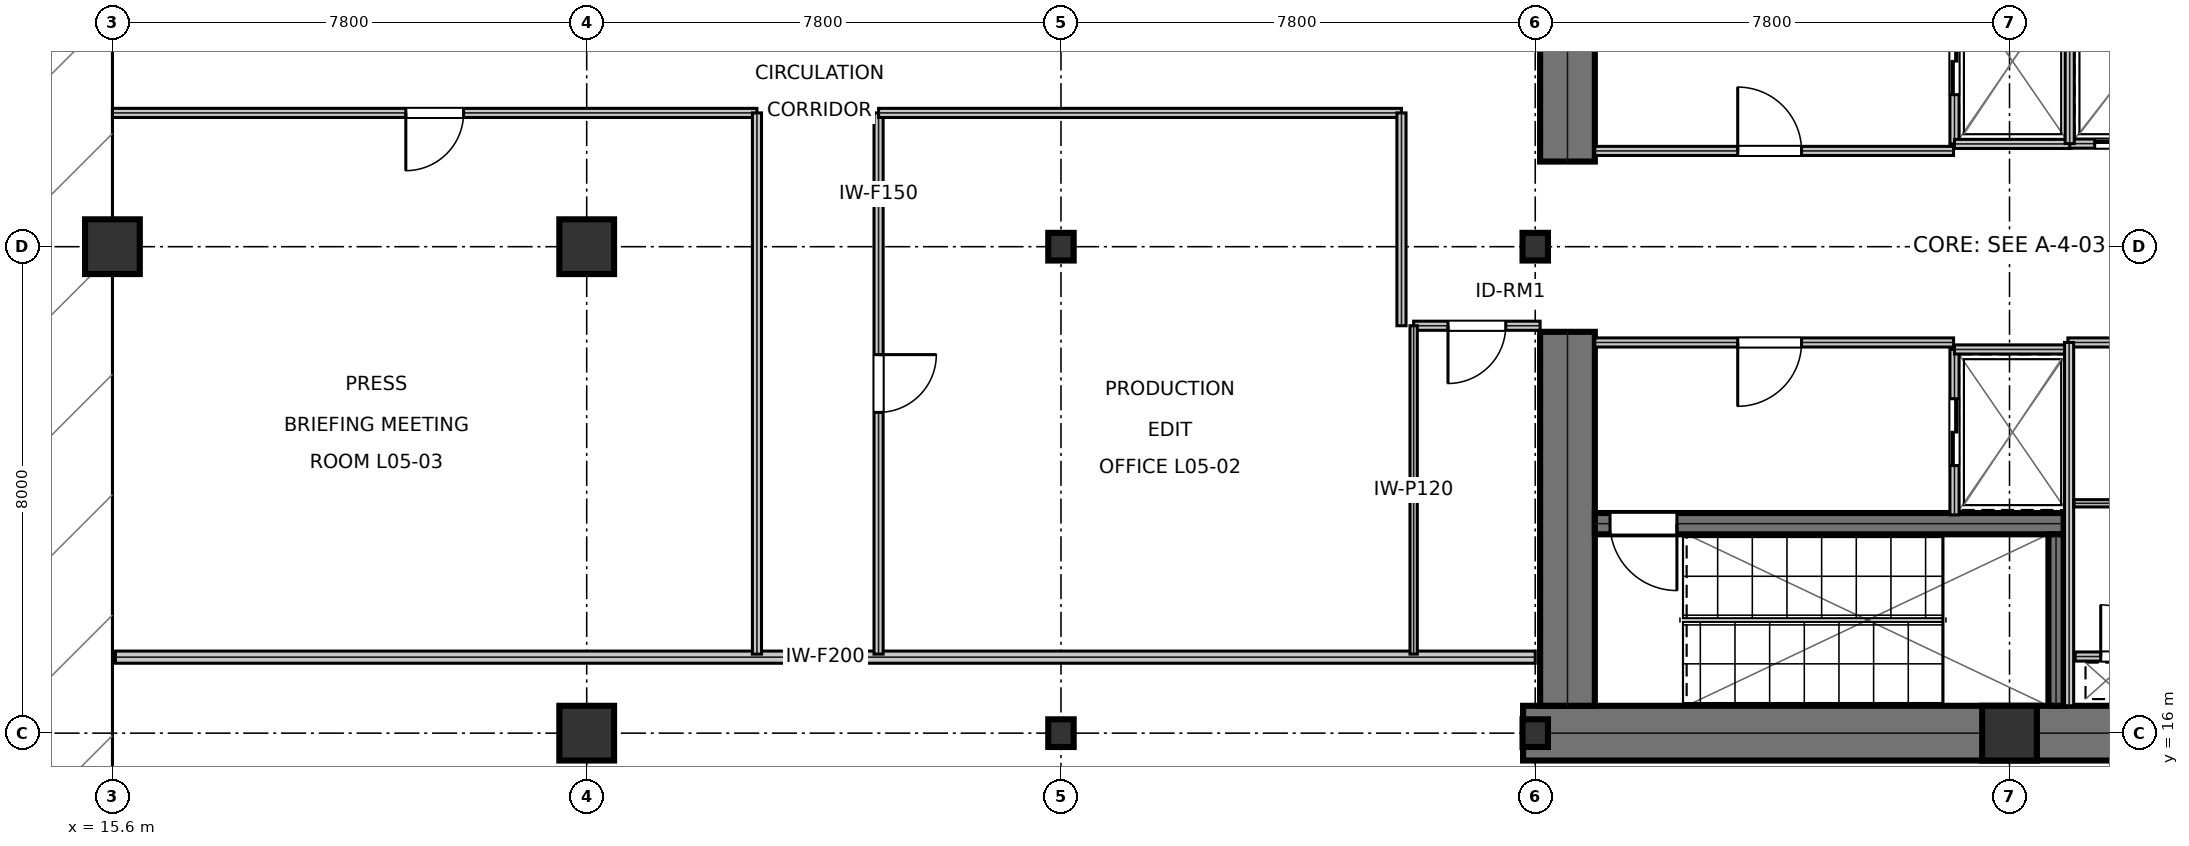
"""IFC4 building model, lengths in metres.
Left out: names, types, materials, properties, quantities, classifications, styles, units other than length and angle.
Written with IfcOpenShell. Run it as: python <this file> out.ifc"""

import sys

from ifc_helpers import new_model, si_unit, direction, frame, frame_2d, origin, origin_2d, place, context, subcontext, project, spatial, rectangle, i_section, extrude, element, fill, save


model = new_model("IFC4")
c1 = context("Model", 3, precision=1e-05, world=origin(), true_north=direction((0.0, 1.0)))
c2 = subcontext(c1, "Body", "Model", "MODEL_VIEW")
j1 = project(units=[si_unit("LENGTHUNIT", "METRE"), si_unit("PLANEANGLEUNIT", "RADIAN")], contexts=[c1])
p1 = place(None, origin())
s1 = spatial("IfcSite", under=j1, at=p1, CompositionType="ELEMENT")
p2 = place(p1, origin())
s2 = spatial("IfcBuilding", under=s1, at=p2, CompositionType="ELEMENT")
p3 = place(p2, frame((0.0, 0.0, 27.0)))
s3 = spatial("IfcBuildingStorey", under=s2, at=p3, CompositionType="ELEMENT", Elevation=27.0)
p4 = place(p3, frame((38.8, 16.0, 0.0), z_axis=(0.0, 0.0, 1.0), x_axis=(1.0, 0.0, 0.0)))
e1 = element("IfcWall", 1, at=p4, inside=s3, PredefinedType="SHEAR", context=c2, shape_type="SweptSolid", body=[
    extrude(rectangle(XDim=16.0, YDim=0.9, at=frame_2d((8.0, 0.0))), origin(), (0.0, 0.0, 1.0), 5.08),
])
for number, where, z_axis, x_axis in (
    (2, (39.53, 16.45, 0.0), (0.0, 0.0, 1.0), (0.0, 1.0, 0.0)),
    (3, (39.53, 25.4, 0.0), (0.0, 0.0, 1.0), (0.0, 1.0, 0.0)),
):
    element("IfcWall", number, at=place(p3, frame(where, z_axis=z_axis, x_axis=x_axis)), inside=s3, PredefinedType="SHEAR", context=c2, shape_type="SweptSolid", body=[
        extrude(rectangle(XDim=6.15, YDim=0.9, at=frame_2d((3.075, 0.0))), origin(), (0.0, 0.0, 1.0), 5.08),
    ])
p5 = place(p3, frame((39.98, 19.445, 0.0), z_axis=(0.0, 0.0, 1.0), x_axis=(1.0, 0.0, 0.0)))
e4 = element("IfcWall", 4, at=p5, inside=s3, PredefinedType="SHEAR", context=c2, shape_type="SweptSolid", body=[
    extrude(rectangle(XDim=7.71, YDim=0.35, at=frame_2d((3.855, 0.0))), origin(), (0.0, 0.0, 1.0), 5.08),
])
p6 = place(p5, frame((0.25, 0.0, 0.0)))
e5 = element("IfcOpeningElement", 5, at=p6, cuts=e4, PredefinedType="OPENING", context=c2, shape_type="SweptSolid", body=[
    extrude(rectangle(XDim=1.1, YDim=2.15, at=frame_2d((0.55, 1.075))), frame((0.0, 0.185, 0.0), z_axis=(0.0, -1.0, 0.0), x_axis=(1.0, 0.0, 0.0)), (0.0, 0.0, 1.0), 0.37),
])
p7 = place(p3, frame((47.565, 16.45, 0.0), z_axis=(0.0, 0.0, 1.0), x_axis=(0.0, 1.0, 0.0)))
e6 = element("IfcWall", 6, at=p7, inside=s3, PredefinedType="SHEAR", context=c2, shape_type="SweptSolid", body=[
    extrude(rectangle(XDim=2.82, YDim=0.25, at=frame_2d((1.41, 0.0))), origin(), (0.0, 0.0, 1.0), 5.08),
])
for number, where, z_axis, x_axis in (
    (7, (15.6, 24.0, 0.0), (0.0, 0.0, 1.0), (1.0, 0.0, 0.0)),
    (8, (23.4, 16.0, 0.0), (0.0, 0.0, 1.0), (1.0, 0.0, 0.0)),
    (9, (23.4, 24.0, 0.0), (0.0, 0.0, 1.0), (1.0, 0.0, 0.0)),
):
    element("IfcColumn", number, at=place(p3, frame(where, z_axis=z_axis, x_axis=x_axis)), inside=s3, PredefinedType="COLUMN", context=c2, shape_type="SweptSolid", body=[
        extrude(rectangle(XDim=0.9, YDim=0.9, at=origin_2d()), origin(), (0.0, 0.0, 1.0), 5.395),
    ])
for number, where, z_axis, x_axis in (
    (10, (31.2, 16.0, 0.0), (0.0, 0.0, 1.0), (1.0, 0.0, 0.0)),
    (11, (31.2, 24.0, 0.0), (0.0, 0.0, 1.0), (1.0, 0.0, 0.0)),
    (12, (39.0, 16.0, 0.0), (0.0, 0.0, 1.0), (1.0, 0.0, 0.0)),
    (13, (39.0, 24.0, 0.0), (0.0, 0.0, 1.0), (1.0, 0.0, 0.0)),
):
    element("IfcColumn", number, at=place(p3, frame(where, z_axis=z_axis, x_axis=x_axis)), inside=s3, PredefinedType="COLUMN", context=c2, shape_type="SweptSolid", body=[
        extrude(i_section(OverallWidth=0.418, OverallDepth=0.455, WebThickness=0.042, FlangeThickness=0.068, at=origin_2d()), origin(), (0.0, 0.0, 1.0), 5.395),
    ])
p8 = place(p3, frame((46.8, 16.0, 0.0), z_axis=(0.0, 0.0, 1.0), x_axis=(1.0, 0.0, 0.0)))
e14 = element("IfcColumn", 14, at=p8, inside=s3, PredefinedType="COLUMN", context=c2, shape_type="SweptSolid", body=[
    extrude(rectangle(XDim=0.9, YDim=0.9, at=origin_2d()), origin(), (0.0, 0.0, 1.0), 5.395),
])
p9 = place(p3, frame((39.98, 25.575, 0.0), z_axis=(0.0, 0.0, 1.0), x_axis=(1.0, 0.0, 0.0)))
e15 = element("IfcWall", 15, at=p9, inside=s3, PredefinedType="PARTITIONING", context=c2, shape_type="SweptSolid", body=[
    extrude(rectangle(XDim=5.9, YDim=0.15, at=frame_2d((2.95, 0.0))), origin(), (0.0, 0.0, 1.0), 5.08),
])
p10 = place(p9, frame((2.35, 0.0, 0.0)))
e16 = element("IfcOpeningElement", 16, at=p10, cuts=e15, PredefinedType="OPENING", context=c2, shape_type="SweptSolid", body=[
    extrude(rectangle(XDim=1.05, YDim=2.15, at=frame_2d((0.525, 1.075))), frame((0.0, 0.085, 0.0), z_axis=(0.0, -1.0, 0.0), x_axis=(1.0, 0.0, 0.0)), (0.0, 0.0, 1.0), 0.17),
])
p11 = place(p3, frame((39.98, 22.425, 0.0), z_axis=(0.0, 0.0, 1.0), x_axis=(1.0, 0.0, 0.0)))
e17 = element("IfcWall", 17, at=p11, inside=s3, PredefinedType="PARTITIONING", context=c2, shape_type="SweptSolid", body=[
    extrude(rectangle(XDim=5.9, YDim=0.15, at=frame_2d((2.95, 0.0))), origin(), (0.0, 0.0, 1.0), 5.08),
])
p12 = place(p11, frame((2.35, 0.0, 0.0)))
e18 = element("IfcOpeningElement", 18, at=p12, cuts=e17, PredefinedType="OPENING", context=c2, shape_type="SweptSolid", body=[
    extrude(rectangle(XDim=1.05, YDim=2.15, at=frame_2d((0.525, 1.075))), frame((0.0, 0.085, 0.0), z_axis=(0.0, -1.0, 0.0), x_axis=(1.0, 0.0, 0.0)), (0.0, 0.0, 1.0), 0.17),
])
p13 = place(p3, frame((45.895, 25.69, 0.0), z_axis=(0.0, 0.0, 1.0), x_axis=(0.0, 1.0, 0.0)))
e19 = element("IfcWall", 19, at=p13, inside=s3, PredefinedType="PARTITIONING", context=c2, shape_type="SweptSolid", body=[
    extrude(rectangle(XDim=2.72, YDim=0.15, at=frame_2d((1.36, 0.0))), origin(), (0.0, 0.0, 1.0), 5.08),
])
p14 = place(p13, frame((0.81, 0.0, 0.0)))
e20 = element("IfcOpeningElement", 20, at=p14, cuts=e19, PredefinedType="OPENING", context=c2, shape_type="SweptSolid", body=[
    extrude(rectangle(XDim=1.1, YDim=2.15, at=frame_2d((0.55, 1.075))), frame((0.0, 0.085, 0.0), z_axis=(0.0, -1.0, 0.0), x_axis=(1.0, 0.0, 0.0)), (0.0, 0.0, 1.0), 0.17),
])
p15 = place(p3, frame((45.895, 25.69, 0.0), z_axis=(0.0, 0.0, 1.0), x_axis=(1.0, 0.0, 0.0)))
e21 = element("IfcWall", 21, at=p15, inside=s3, PredefinedType="PARTITIONING", context=c2, shape_type="SweptSolid", body=[
    extrude(rectangle(XDim=1.915, YDim=0.15, at=frame_2d((0.958, 0.0))), origin(), (0.0, 0.0, 1.0), 5.08),
])
p16 = place(p3, frame((45.895, 19.59, 0.0), z_axis=(0.0, 0.0, 1.0), x_axis=(0.0, 1.0, 0.0)))
e22 = element("IfcWall", 22, at=p16, inside=s3, PredefinedType="PARTITIONING", context=c2, shape_type="SweptSolid", body=[
    extrude(rectangle(XDim=2.72, YDim=0.15, at=frame_2d((1.36, 0.0))), origin(), (0.0, 0.0, 1.0), 5.08),
])
p17 = place(p16, frame((0.81, 0.0, 0.0)))
e23 = element("IfcOpeningElement", 23, at=p17, cuts=e22, PredefinedType="OPENING", context=c2, shape_type="SweptSolid", body=[
    extrude(rectangle(XDim=1.1, YDim=2.15, at=frame_2d((0.55, 1.075))), frame((0.0, 0.085, 0.0), z_axis=(0.0, -1.0, 0.0), x_axis=(1.0, 0.0, 0.0)), (0.0, 0.0, 1.0), 0.17),
])
p18 = place(p3, frame((45.895, 22.31, 0.0), z_axis=(0.0, 0.0, 1.0), x_axis=(1.0, 0.0, 0.0)))
e24 = element("IfcWall", 24, at=p18, inside=s3, PredefinedType="PARTITIONING", context=c2, shape_type="SweptSolid", body=[
    extrude(rectangle(XDim=1.915, YDim=0.15, at=frame_2d((0.958, 0.0))), origin(), (0.0, 0.0, 1.0), 5.08),
])
p19 = place(p3, frame((47.79, 25.695, 0.0), z_axis=(0.0, 0.0, 1.0), x_axis=(1.0, 0.0, 0.0)))
e25 = element("IfcWall", 25, at=p19, inside=s3, PredefinedType="PARTITIONING", context=c2, shape_type="SweptSolid", body=[
    extrude(rectangle(XDim=1.92, YDim=0.15, at=frame_2d((0.96, 0.0))), origin(), (0.0, 0.0, 1.0), 5.08),
])
p20 = place(p19, frame((0.41, 0.0, 0.0)))
e26 = element("IfcOpeningElement", 26, at=p20, cuts=e25, PredefinedType="OPENING", context=c2, shape_type="SweptSolid", body=[
    extrude(rectangle(XDim=1.1, YDim=2.15, at=frame_2d((0.55, 1.075))), frame((0.0, 0.085, 0.0), z_axis=(0.0, -1.0, 0.0), x_axis=(1.0, 0.0, 0.0)), (0.0, 0.0, 1.0), 0.17),
])
p21 = place(p3, frame((47.79, 25.695, 0.0), z_axis=(0.0, 0.0, 1.0), x_axis=(0.0, 1.0, 0.0)))
e27 = element("IfcWall", 27, at=p21, inside=s3, PredefinedType="PARTITIONING", context=c2, shape_type="SweptSolid", body=[
    extrude(rectangle(XDim=2.415, YDim=0.15, at=frame_2d((1.208, 0.0))), origin(), (0.0, 0.0, 1.0), 5.08),
])
p22 = place(p3, frame((47.88, 17.26, 0.0), z_axis=(0.0, 0.0, 1.0), x_axis=(1.0, 0.0, 0.0)))
e28 = element("IfcWall", 28, at=p22, inside=s3, PredefinedType="PARTITIONING", context=c2, shape_type="SweptSolid", body=[
    extrude(rectangle(XDim=1.72, YDim=0.15, at=frame_2d((0.86, 0.0))), origin(), (0.0, 0.0, 1.0), 5.08),
])
p23 = place(p22, frame((0.42, 0.0, 0.0)))
e29 = element("IfcOpeningElement", 29, at=p23, cuts=e28, PredefinedType="OPENING", context=c2, shape_type="SweptSolid", body=[
    extrude(rectangle(XDim=0.85, YDim=2.15, at=frame_2d((0.425, 1.075))), frame((0.0, 0.085, 0.0), z_axis=(0.0, -1.0, 0.0), x_axis=(1.0, 0.0, 0.0)), (0.0, 0.0, 1.0), 0.17),
])
p24 = place(p3, frame((47.76, 22.425, 0.0), z_axis=(0.0, 0.0, 1.0), x_axis=(1.0, 0.0, 0.0)))
e30 = element("IfcWall", 30, at=p24, inside=s3, PredefinedType="PARTITIONING", context=c2, shape_type="SweptSolid", body=[
    extrude(rectangle(XDim=1.96, YDim=0.15, at=frame_2d((0.98, 0.0))), origin(), (0.0, 0.0, 1.0), 5.08),
])
p25 = place(p3, frame((47.78, 16.45, 0.0), z_axis=(0.0, 0.0, 1.0), x_axis=(0.0, 1.0, 0.0)))
e31 = element("IfcWall", 31, at=p25, inside=s3, PredefinedType="PARTITIONING", context=c2, shape_type="SweptSolid", body=[
    extrude(rectangle(XDim=5.975, YDim=0.15, at=frame_2d((2.988, 0.0))), origin(), (0.0, 0.0, 1.0), 5.08),
])
p26 = place(p3, frame((47.86, 19.78, 0.0), z_axis=(0.0, 0.0, 1.0), x_axis=(1.0, 0.0, 0.0)))
e32 = element("IfcWall", 32, at=p26, inside=s3, PredefinedType="PARTITIONING", context=c2, shape_type="SweptSolid", body=[
    extrude(rectangle(XDim=1.76, YDim=0.12, at=frame_2d((0.88, 0.0))), origin(), (0.0, 0.0, 1.0), 5.08),
])
p27 = place(p3, frame((15.65, 17.25, 0.0), z_axis=(0.0, 0.0, 1.0), x_axis=(1.0, 0.0, 0.0)))
e33 = element("IfcWall", 33, at=p27, inside=s3, PredefinedType="SOLIDWALL", context=c2, shape_type="SweptSolid", body=[
    extrude(rectangle(XDim=23.35, YDim=0.2, at=frame_2d((11.675, 0.0))), origin(), (0.0, 0.0, 1.0), 3.648),
])
p28 = place(p3, frame((37.0, 22.7, 0.0), z_axis=(0.0, 0.0, 1.0), x_axis=(1.0, 0.0, 0.0)))
e34 = element("IfcWall", 34, at=p28, inside=s3, PredefinedType="PARTITIONING", context=c2, shape_type="SweptSolid", body=[
    extrude(rectangle(XDim=2.08, YDim=0.15, at=frame_2d((1.04, 0.0))), origin(), (0.0, 0.0, 1.0), 4.375),
])
p29 = place(p28, frame((0.565, 0.0, 0.0)))
e35 = element("IfcOpeningElement", 35, at=p29, cuts=e34, PredefinedType="OPENING", context=c2, shape_type="SweptSolid", body=[
    extrude(rectangle(XDim=0.95, YDim=2.15, at=frame_2d((0.475, 1.075))), frame((0.0, 0.085, 0.0), z_axis=(0.0, -1.0, 0.0), x_axis=(1.0, 0.0, 0.0)), (0.0, 0.0, 1.0), 0.17),
])
p30 = place(p3, frame((28.2, 17.3, 0.0), z_axis=(0.0, 0.0, 1.0), x_axis=(0.0, 1.0, 0.0)))
e36 = element("IfcWall", 36, at=p30, inside=s3, PredefinedType="PARTITIONING", context=c2, shape_type="SweptSolid", body=[
    extrude(rectangle(XDim=8.9, YDim=0.15, at=frame_2d((4.45, 0.0))), origin(), (0.0, 0.0, 1.0), 4.298),
])
p31 = place(p30, frame((3.975, 0.0, 0.0)))
e37 = element("IfcOpeningElement", 37, at=p31, cuts=e36, PredefinedType="OPENING", context=c2, shape_type="SweptSolid", body=[
    extrude(rectangle(XDim=0.95, YDim=2.15, at=frame_2d((0.475, 1.075))), frame((0.0, 0.085, 0.0), z_axis=(0.0, -1.0, 0.0), x_axis=(1.0, 0.0, 0.0)), (0.0, 0.0, 1.0), 0.17),
])
p32 = place(p3, frame((15.6, 26.2, 0.0), z_axis=(0.0, 0.0, 1.0), x_axis=(1.0, 0.0, 0.0)))
e38 = element("IfcWall", 38, at=p32, inside=s3, PredefinedType="PARTITIONING", context=c2, shape_type="SweptSolid", body=[
    extrude(rectangle(XDim=10.6, YDim=0.15, at=frame_2d((5.3, 0.0))), origin(), (0.0, 0.0, 1.0), 3.648),
])
p33 = place(p32, frame((4.825, 0.0, 0.0)))
e39 = element("IfcOpeningElement", 39, at=p33, cuts=e38, PredefinedType="OPENING", context=c2, shape_type="SweptSolid", body=[
    extrude(rectangle(XDim=0.95, YDim=2.15, at=frame_2d((0.475, 1.075))), frame((0.0, 0.085, 0.0), z_axis=(0.0, -1.0, 0.0), x_axis=(1.0, 0.0, 0.0)), (0.0, 0.0, 1.0), 0.17),
])
p34 = place(p3, frame((28.2, 26.2, 0.0), z_axis=(0.0, 0.0, 1.0), x_axis=(1.0, 0.0, 0.0)))
e40 = element("IfcWall", 40, at=p34, inside=s3, PredefinedType="PARTITIONING", context=c2, shape_type="SweptSolid", body=[
    extrude(rectangle(XDim=8.6, YDim=0.15, at=frame_2d((4.3, 0.0))), origin(), (0.0, 0.0, 1.0), 4.375),
])
p35 = place(p3, frame((36.8, 22.7, 0.0), z_axis=(0.0, 0.0, 1.0), x_axis=(0.0, 1.0, 0.0)))
e41 = element("IfcWall", 41, at=p35, inside=s3, PredefinedType="PARTITIONING", context=c2, shape_type="SweptSolid", body=[
    extrude(rectangle(XDim=3.5, YDim=0.15, at=frame_2d((1.75, 0.0))), origin(), (0.0, 0.0, 1.0), 4.298),
])
p36 = place(p3, frame((26.2, 17.3, 0.0), z_axis=(0.0, 0.0, 1.0), x_axis=(0.0, 1.0, 0.0)))
e42 = element("IfcWall", 42, at=p36, inside=s3, PredefinedType="PARTITIONING", context=c2, shape_type="SweptSolid", body=[
    extrude(rectangle(XDim=8.9, YDim=0.15, at=frame_2d((4.45, 0.0))), origin(), (0.0, 0.0, 1.0), 4.298),
])
p37 = place(p3, frame((37.0, 17.3, 0.0), z_axis=(0.0, 0.0, 1.0), x_axis=(0.0, 1.0, 0.0)))
e43 = element("IfcWall", 43, at=p37, inside=s3, PredefinedType="PARTITIONING", context=c2, shape_type="SweptSolid", body=[
    extrude(rectangle(XDim=5.4, YDim=0.12, at=frame_2d((2.7, 0.0))), origin(), (0.0, 0.0, 1.0), 4.661),
])
p38 = place(p10, origin())
e44 = element("IfcDoor", 44, at=p38, inside=s3, OperationType="SINGLE_SWING_LEFT", PredefinedType="DOOR", context=c2, shape_type="SweptSolid", body=[
    extrude(rectangle(XDim=1.05, YDim=2.15, at=frame_2d((0.525, 1.075))), frame((0.0, 0.025, 0.0), z_axis=(0.0, -1.0, 0.0), x_axis=(1.0, 0.0, 0.0)), (0.0, 0.0, 1.0), 0.05),
])
fill(e16, e44)
p39 = place(p12, frame((1.05, 0.0, 0.0), z_axis=(0.0, 0.0, 1.0), x_axis=(-1.0, 0.0, 0.0)))
e45 = element("IfcDoor", 45, at=p39, inside=s3, OperationType="SINGLE_SWING_RIGHT", PredefinedType="DOOR", context=c2, shape_type="SweptSolid", body=[
    extrude(rectangle(XDim=1.05, YDim=2.15, at=frame_2d((0.525, 1.075))), frame((0.0, 0.025, 0.0), z_axis=(0.0, -1.0, 0.0), x_axis=(1.0, 0.0, 0.0)), (0.0, 0.0, 1.0), 0.05),
])
fill(e18, e45)
p40 = place(p14, frame((1.1, 0.0, 0.0), z_axis=(0.0, 0.0, 1.0), x_axis=(-1.0, 0.0, 0.0)))
e46 = element("IfcDoor", 46, at=p40, inside=s3, OperationType="DOUBLE_DOOR_SLIDING", PredefinedType="DOOR", context=c2, shape_type="SweptSolid", body=[
    extrude(rectangle(XDim=1.1, YDim=2.15, at=frame_2d((0.55, 1.075))), frame((0.0, 0.025, 0.0), z_axis=(0.0, -1.0, 0.0), x_axis=(1.0, 0.0, 0.0)), (0.0, 0.0, 1.0), 0.05),
])
fill(e20, e46)
p41 = place(p17, frame((1.1, 0.0, 0.0), z_axis=(0.0, 0.0, 1.0), x_axis=(-1.0, 0.0, 0.0)))
e47 = element("IfcDoor", 47, at=p41, inside=s3, OperationType="DOUBLE_DOOR_SLIDING", PredefinedType="DOOR", context=c2, shape_type="SweptSolid", body=[
    extrude(rectangle(XDim=1.1, YDim=2.15, at=frame_2d((0.55, 1.075))), frame((0.0, 0.025, 0.0), z_axis=(0.0, -1.0, 0.0), x_axis=(1.0, 0.0, 0.0)), (0.0, 0.0, 1.0), 0.05),
])
fill(e23, e47)
p42 = place(p20, frame((1.1, 0.0, 0.0), z_axis=(0.0, 0.0, 1.0), x_axis=(-1.0, 0.0, 0.0)))
e48 = element("IfcDoor", 48, at=p42, inside=s3, OperationType="DOUBLE_DOOR_SLIDING", PredefinedType="DOOR", context=c2, shape_type="SweptSolid", body=[
    extrude(rectangle(XDim=1.1, YDim=2.15, at=frame_2d((0.55, 1.075))), frame((0.0, 0.025, 0.0), z_axis=(0.0, -1.0, 0.0), x_axis=(1.0, 0.0, 0.0)), (0.0, 0.0, 1.0), 0.05),
])
fill(e26, e48)
p43 = place(p23, origin())
e49 = element("IfcDoor", 49, at=p43, inside=s3, OperationType="SINGLE_SWING_LEFT", PredefinedType="TRAPDOOR", context=c2, shape_type="SweptSolid", body=[
    extrude(rectangle(XDim=0.85, YDim=2.15, at=frame_2d((0.425, 1.075))), frame((0.0, 0.025, 0.0), z_axis=(0.0, -1.0, 0.0), x_axis=(1.0, 0.0, 0.0)), (0.0, 0.0, 1.0), 0.05),
])
fill(e29, e49)
p44 = place(p29, frame((0.95, 0.0, 0.0), z_axis=(0.0, 0.0, 1.0), x_axis=(-1.0, 0.0, 0.0)))
e50 = element("IfcDoor", 50, at=p44, inside=s3, OperationType="SINGLE_SWING_RIGHT", PredefinedType="DOOR", context=c2, shape_type="SweptSolid", body=[
    extrude(rectangle(XDim=0.95, YDim=2.15, at=frame_2d((0.475, 1.075))), frame((0.0, 0.025, 0.0), z_axis=(0.0, -1.0, 0.0), x_axis=(1.0, 0.0, 0.0)), (0.0, 0.0, 1.0), 0.05),
])
fill(e35, e50)
p45 = place(p31, frame((0.95, 0.0, 0.0), z_axis=(0.0, 0.0, 1.0), x_axis=(-1.0, 0.0, 0.0)))
e51 = element("IfcDoor", 51, at=p45, inside=s3, OperationType="SINGLE_SWING_LEFT", PredefinedType="DOOR", context=c2, shape_type="SweptSolid", body=[
    extrude(rectangle(XDim=0.95, YDim=2.15, at=frame_2d((0.475, 1.075))), frame((0.0, 0.025, 0.0), z_axis=(0.0, -1.0, 0.0), x_axis=(1.0, 0.0, 0.0)), (0.0, 0.0, 1.0), 0.05),
])
fill(e37, e51)
p46 = place(p33, frame((0.95, 0.0, 0.0), z_axis=(0.0, 0.0, 1.0), x_axis=(-1.0, 0.0, 0.0)))
e52 = element("IfcDoor", 52, at=p46, inside=s3, OperationType="SINGLE_SWING_RIGHT", PredefinedType="DOOR", context=c2, shape_type="SweptSolid", body=[
    extrude(rectangle(XDim=0.95, YDim=2.15, at=frame_2d((0.475, 1.075))), frame((0.0, 0.025, 0.0), z_axis=(0.0, -1.0, 0.0), x_axis=(1.0, 0.0, 0.0)), (0.0, 0.0, 1.0), 0.05),
])
fill(e39, e52)
p47 = place(p6, frame((1.1, 0.0, 0.0), z_axis=(0.0, 0.0, 1.0), x_axis=(-1.0, 0.0, 0.0)))
e53 = element("IfcDoor", 53, at=p47, inside=s3, OperationType="SINGLE_SWING_LEFT", PredefinedType="DOOR", context=c2, shape_type="SweptSolid", body=[
    extrude(rectangle(XDim=1.1, YDim=2.15, at=frame_2d((0.55, 1.075))), frame((0.0, 0.025, 0.0), z_axis=(0.0, -1.0, 0.0), x_axis=(1.0, 0.0, 0.0)), (0.0, 0.0, 1.0), 0.05),
])
fill(e5, e53)
save(model, sys.argv[1])
